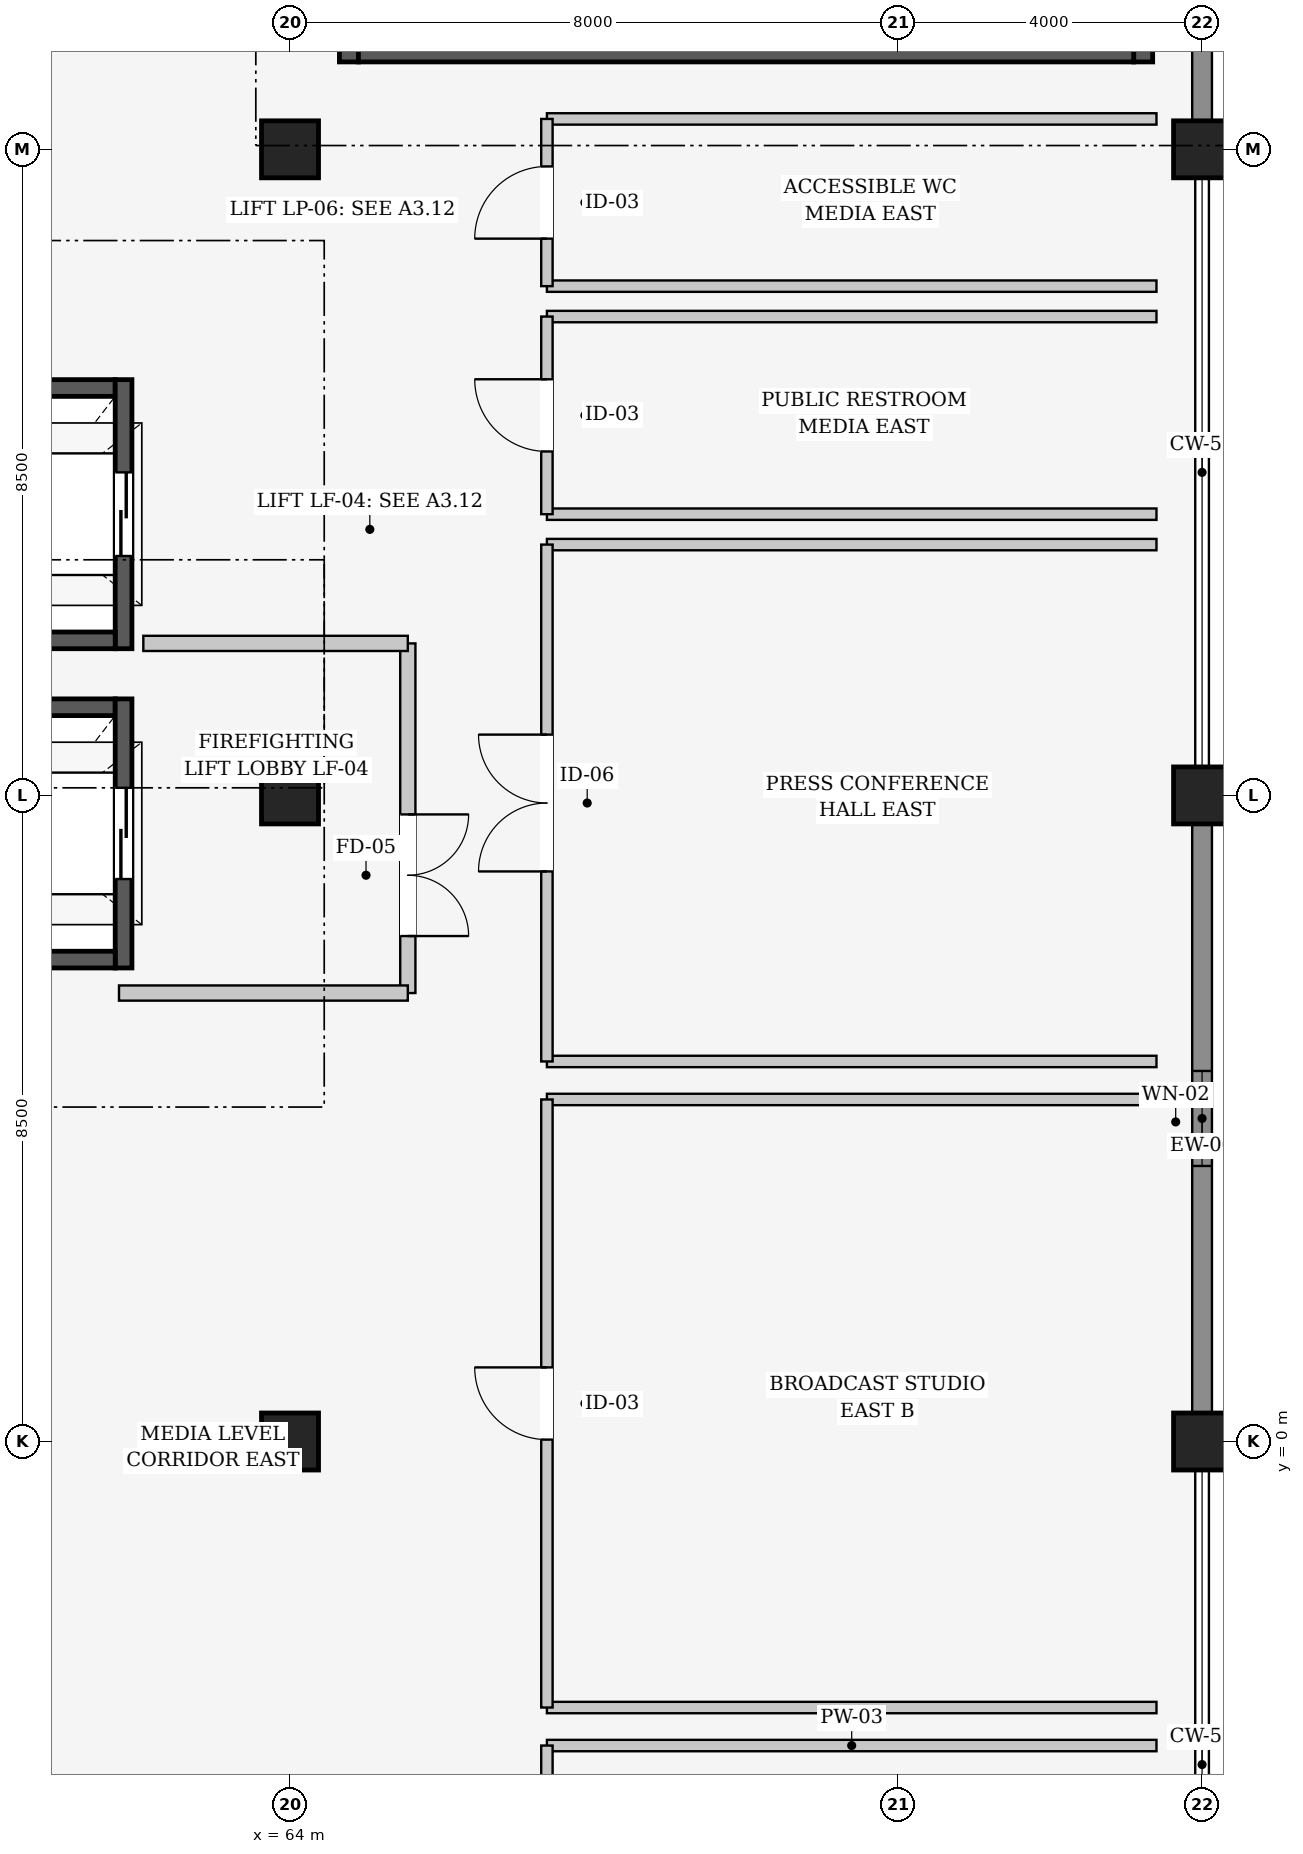
"""IFC4 building model, lengths in metres.
Left out: names, types, materials, properties, quantities, classifications, styles, units other than length and angle.
Written with IfcOpenShell. Run it as: python <this file> out.ifc"""

import sys

from ifc_helpers import new_model, si_unit, direction, frame, frame_2d, origin, origin_2d, place, context, subcontext, project, spatial, rectangle, extrude, element, fill, save


model = new_model("IFC4")
c1 = context("Model", 3, precision=1e-05, world=origin(), true_north=direction((0.0, 1.0)))
c2 = subcontext(c1, "Body", "Model", "MODEL_VIEW")
j1 = project(units=[si_unit("LENGTHUNIT", "METRE"), si_unit("PLANEANGLEUNIT", "RADIAN")], contexts=[c1])
p1 = place(None, origin())
s1 = spatial("IfcSite", under=j1, at=p1, CompositionType="ELEMENT")
p2 = place(p1, origin())
s2 = spatial("IfcBuilding", under=s1, at=p2, CompositionType="ELEMENT")
p3 = place(p2, frame((0.0, 0.0, 26.4)))
s3 = spatial("IfcBuildingStorey", under=s2, at=p3, CompositionType="ELEMENT", Elevation=26.4)
for number, where, z_axis, x_axis in (
    (1, (64.0, 0.0, 0.0), (0.0, 0.0, 1.0), (1.0, 0.0, 0.0)),
    (2, (64.0, 8.5, 0.0), (0.0, 0.0, 1.0), (1.0, 0.0, 0.0)),
    (3, (64.0, 17.0, 0.0), (0.0, 0.0, 1.0), (1.0, 0.0, 0.0)),
    (4, (76.0, 0.0, 0.0), (0.0, 0.0, 1.0), (1.0, 0.0, 0.0)),
    (5, (76.0, 8.5, 0.0), (0.0, 0.0, 1.0), (1.0, 0.0, 0.0)),
    (6, (76.0, 17.0, 0.0), (0.0, 0.0, 1.0), (1.0, 0.0, 0.0)),
):
    element("IfcColumn", number, at=place(p3, frame(where, z_axis=z_axis, x_axis=x_axis)), inside=s3, PredefinedType="COLUMN", context=c2, shape_type="SweptSolid", body=[
        extrude(rectangle(XDim=0.75, YDim=0.75, at=origin_2d()), origin(), (0.0, 0.0, 1.0), 5.4),
    ])
p4 = place(p3, frame((76.0, 8.143, 0.0), z_axis=(0.0, 0.0, 1.0), x_axis=(0.0, -1.0, 0.0)))
e7 = element("IfcWall", 7, at=p4, inside=s3, PredefinedType="SOLIDWALL", context=c2, shape_type="SweptSolid", body=[
    extrude(rectangle(XDim=7.786, YDim=0.26, at=frame_2d((3.893, 0.0))), origin(), (0.0, 0.0, 1.0), 4.22),
])
p5 = place(p4, frame((3.268, 0.0, 0.95)))
e8 = element("IfcOpeningElement", 8, at=p5, cuts=e7, PredefinedType="OPENING", context=c2, shape_type="SweptSolid", body=[
    extrude(rectangle(XDim=1.25, YDim=1.25, at=frame_2d((0.625, 0.625))), frame((0.0, 0.14, 0.0), z_axis=(0.0, -1.0, 0.0), x_axis=(1.0, 0.0, 0.0)), (0.0, 0.0, 1.0), 0.28),
])
p6 = place(p3, frame((76.0, 24.643, 0.0), z_axis=(0.0, 0.0, 1.0), x_axis=(0.0, -1.0, 0.0)))
e9 = element("IfcWall", 9, at=p6, inside=s3, PredefinedType="SOLIDWALL", context=c2, shape_type="SweptSolid", body=[
    extrude(rectangle(XDim=7.286, YDim=0.26, at=frame_2d((3.643, 0.0))), origin(), (0.0, 0.0, 1.0), 4.22),
])
p7 = place(p6, frame((2.918, 0.0, 0.95)))
e10 = element("IfcOpeningElement", 10, at=p7, cuts=e9, PredefinedType="OPENING", context=c2, shape_type="SweptSolid", body=[
    extrude(rectangle(XDim=1.45, YDim=1.25, at=frame_2d((0.725, 0.625))), frame((0.0, 0.14, 0.0), z_axis=(0.0, -1.0, 0.0), x_axis=(1.0, 0.0, 0.0)), (0.0, 0.0, 1.0), 0.28),
])
p8 = place(p3, frame((64.775, 18.15, 0.0), z_axis=(0.0, 0.0, 1.0), x_axis=(0.0, 1.0, 0.0)))
e11 = element("IfcWall", 11, at=p8, inside=s3, PredefinedType="SHEAR", context=c2, shape_type="SweptSolid", body=[
    extrude(rectangle(XDim=5.7, YDim=0.25, at=frame_2d((2.85, 0.0))), origin(), (0.0, 0.0, 1.0), 3.6),
])
p9 = place(p8, frame((2.1, 0.0, 0.0)))
e12 = element("IfcOpeningElement", 12, at=p9, cuts=e11, PredefinedType="OPENING", context=c2, shape_type="SweptSolid", body=[
    extrude(rectangle(XDim=1.5, YDim=2.2, at=frame_2d((0.75, 1.1))), frame((0.0, 0.135, 0.0), z_axis=(0.0, -1.0, 0.0), x_axis=(1.0, 0.0, 0.0)), (0.0, 0.0, 1.0), 0.27),
])
p10 = place(p3, frame((75.225, 23.85, 0.0), z_axis=(0.0, 0.0, 1.0), x_axis=(0.0, -1.0, 0.0)))
e13 = element("IfcWall", 13, at=p10, inside=s3, PredefinedType="SHEAR", context=c2, shape_type="SweptSolid", body=[
    extrude(rectangle(XDim=5.7, YDim=0.25, at=frame_2d((2.85, 0.0))), origin(), (0.0, 0.0, 1.0), 3.6),
])
p11 = place(p3, frame((75.1, 18.275, 0.0), z_axis=(0.0, 0.0, 1.0), x_axis=(-1.0, 0.0, 0.0)))
e14 = element("IfcWall", 14, at=p11, inside=s3, PredefinedType="SHEAR", context=c2, shape_type="SweptSolid", body=[
    extrude(rectangle(XDim=10.2, YDim=0.25, at=frame_2d((5.1, 0.0))), origin(), (0.0, 0.0, 1.0), 3.6),
])
p12 = place(p3, frame((59.3, 9.66, 0.0), z_axis=(0.0, 0.0, 1.0), x_axis=(1.0, 0.0, 0.0)))
e15 = element("IfcWall", 15, at=p12, inside=s3, PredefinedType="SHEAR", context=c2, shape_type="SweptSolid", body=[
    extrude(rectangle(XDim=2.4, YDim=0.22, at=frame_2d((1.2, 0.0))), origin(), (0.0, 0.0, 1.0), 6.8),
])
p13 = place(p3, frame((61.81, 9.77, 0.0), z_axis=(0.0, 0.0, 1.0), x_axis=(0.0, -1.0, 0.0)))
e16 = element("IfcWall", 16, at=p13, inside=s3, PredefinedType="SHEAR", context=c2, shape_type="SweptSolid", body=[
    extrude(rectangle(XDim=3.54, YDim=0.22, at=frame_2d((1.77, 0.0))), origin(), (0.0, 0.0, 1.0), 6.8),
])
p14 = place(p13, frame((1.17, 0.0, 0.0)))
e17 = element("IfcOpeningElement", 17, at=p14, cuts=e16, PredefinedType="OPENING", context=c2, shape_type="SweptSolid", body=[
    extrude(rectangle(XDim=1.2, YDim=2.2, at=frame_2d((0.6, 1.1))), frame((0.0, 0.12, 0.0), z_axis=(0.0, -1.0, 0.0), x_axis=(1.0, 0.0, 0.0)), (0.0, 0.0, 1.0), 0.24),
])
for number, where, z_axis, x_axis in (
    (18, (61.7, 6.34, 0.0), (0.0, 0.0, 1.0), (-1.0, 0.0, 0.0)),
    (19, (59.3, 13.86, 0.0), (0.0, 0.0, 1.0), (1.0, 0.0, 0.0)),
):
    element("IfcWall", number, at=place(p3, frame(where, z_axis=z_axis, x_axis=x_axis)), inside=s3, PredefinedType="SHEAR", context=c2, shape_type="SweptSolid", body=[
        extrude(rectangle(XDim=2.4, YDim=0.22, at=frame_2d((1.2, 0.0))), origin(), (0.0, 0.0, 1.0), 6.8),
    ])
p15 = place(p3, frame((61.81, 13.97, 0.0), z_axis=(0.0, 0.0, 1.0), x_axis=(0.0, -1.0, 0.0)))
e20 = element("IfcWall", 20, at=p15, inside=s3, PredefinedType="SHEAR", context=c2, shape_type="SweptSolid", body=[
    extrude(rectangle(XDim=3.54, YDim=0.22, at=frame_2d((1.77, 0.0))), origin(), (0.0, 0.0, 1.0), 6.8),
])
p16 = place(p15, frame((1.22, 0.0, 0.0)))
e21 = element("IfcOpeningElement", 21, at=p16, cuts=e20, PredefinedType="OPENING", context=c2, shape_type="SweptSolid", body=[
    extrude(rectangle(XDim=1.1, YDim=2.2, at=frame_2d((0.55, 1.1))), frame((0.0, 0.12, 0.0), z_axis=(0.0, -1.0, 0.0), x_axis=(1.0, 0.0, 0.0)), (0.0, 0.0, 1.0), 0.24),
])
p17 = place(p3, frame((61.7, 10.54, 0.0), z_axis=(0.0, 0.0, 1.0), x_axis=(-1.0, 0.0, 0.0)))
e22 = element("IfcWall", 22, at=p17, inside=s3, PredefinedType="SHEAR", context=c2, shape_type="SweptSolid", body=[
    extrude(rectangle(XDim=2.4, YDim=0.22, at=frame_2d((1.2, 0.0))), origin(), (0.0, 0.0, 1.0), 6.8),
])
p18 = place(p3, frame((65.55, 10.5, 0.0), z_axis=(0.0, 0.0, 1.0), x_axis=(0.0, -1.0, 0.0)))
e23 = element("IfcWall", 23, at=p18, inside=s3, PredefinedType="PARTITIONING", context=c2, shape_type="SweptSolid", body=[
    extrude(rectangle(XDim=4.6, YDim=0.2, at=frame_2d((2.3, 0.0))), origin(), (0.0, 0.0, 1.0), 4.205),
])
p19 = place(p18, frame((2.25, 0.0, 0.0)))
e24 = element("IfcOpeningElement", 24, at=p19, cuts=e23, PredefinedType="OPENING", context=c2, shape_type="SweptSolid", body=[
    extrude(rectangle(XDim=1.6, YDim=2.2, at=frame_2d((0.8, 1.1))), frame((0.0, 0.11, 0.0), z_axis=(0.0, -1.0, 0.0), x_axis=(1.0, 0.0, 0.0)), (0.0, 0.0, 1.0), 0.22),
])
p20 = place(p3, frame((62.07, 10.5, 0.0), z_axis=(0.0, 0.0, 1.0), x_axis=(1.0, 0.0, 0.0)))
e25 = element("IfcWall", 25, at=p20, inside=s3, PredefinedType="PARTITIONING", context=c2, shape_type="SweptSolid", body=[
    extrude(rectangle(XDim=3.48, YDim=0.2, at=frame_2d((1.74, 0.0))), origin(), (0.0, 0.0, 1.0), 4.505),
])
p21 = place(p3, frame((65.55, 5.9, 0.0), z_axis=(0.0, 0.0, 1.0), x_axis=(-1.0, 0.0, 0.0)))
e26 = element("IfcWall", 26, at=p21, inside=s3, PredefinedType="PARTITIONING", context=c2, shape_type="SweptSolid", body=[
    extrude(rectangle(XDim=3.8, YDim=0.2, at=frame_2d((1.9, 0.0))), origin(), (0.0, 0.0, 1.0), 4.505),
])
p22 = place(p3, frame((67.38, -4.0, 0.0), z_axis=(0.0, 0.0, 1.0), x_axis=(1.0, 0.0, 0.0)))
e27 = element("IfcWall", 27, at=p22, inside=s3, PredefinedType="PARTITIONING", context=c2, shape_type="SweptSolid", body=[
    extrude(rectangle(XDim=8.02, YDim=0.15, at=frame_2d((4.01, 0.0))), origin(), (0.0, 0.0, 1.0), 4.842),
])
p23 = place(p3, frame((67.38, -13.0, 0.0), z_axis=(0.0, 0.0, 1.0), x_axis=(0.0, 1.0, 0.0)))
e28 = element("IfcWall", 28, at=p23, inside=s3, PredefinedType="PARTITIONING", context=c2, shape_type="SweptSolid", body=[
    extrude(rectangle(XDim=9.0, YDim=0.15, at=frame_2d((4.5, 0.0))), origin(), (0.0, 0.0, 1.0), 4.205),
])
p24 = place(p23, frame((4.025, 0.0, 0.0)))
e29 = element("IfcOpeningElement", 29, at=p24, cuts=e28, PredefinedType="OPENING", context=c2, shape_type="SweptSolid", body=[
    extrude(rectangle(XDim=0.95, YDim=2.15, at=frame_2d((0.475, 1.075))), frame((0.0, 0.085, 0.0), z_axis=(0.0, -1.0, 0.0), x_axis=(1.0, 0.0, 0.0)), (0.0, 0.0, 1.0), 0.17),
])
p25 = place(p3, frame((67.38, 4.5, 0.0), z_axis=(0.0, 0.0, 1.0), x_axis=(1.0, 0.0, 0.0)))
e30 = element("IfcWall", 30, at=p25, inside=s3, PredefinedType="PARTITIONING", context=c2, shape_type="SweptSolid", body=[
    extrude(rectangle(XDim=8.02, YDim=0.15, at=frame_2d((4.01, 0.0))), origin(), (0.0, 0.0, 1.0), 4.842),
])
p26 = place(p3, frame((75.4, -3.5, 0.0), z_axis=(0.0, 0.0, 1.0), x_axis=(-1.0, 0.0, 0.0)))
e31 = element("IfcWall", 31, at=p26, inside=s3, PredefinedType="PARTITIONING", context=c2, shape_type="SweptSolid", body=[
    extrude(rectangle(XDim=8.02, YDim=0.15, at=frame_2d((4.01, 0.0))), origin(), (0.0, 0.0, 1.0), 5.04),
])
p27 = place(p3, frame((67.38, -3.5, 0.0), z_axis=(0.0, 0.0, 1.0), x_axis=(0.0, 1.0, 0.0)))
e32 = element("IfcWall", 32, at=p27, inside=s3, PredefinedType="PARTITIONING", context=c2, shape_type="SweptSolid", body=[
    extrude(rectangle(XDim=8.0, YDim=0.15, at=frame_2d((4.0, 0.0))), origin(), (0.0, 0.0, 1.0), 4.205),
])
p28 = place(p27, frame((3.525, 0.0, 0.0)))
e33 = element("IfcOpeningElement", 33, at=p28, cuts=e32, PredefinedType="OPENING", context=c2, shape_type="SweptSolid", body=[
    extrude(rectangle(XDim=0.95, YDim=2.15, at=frame_2d((0.475, 1.075))), frame((0.0, 0.085, 0.0), z_axis=(0.0, -1.0, 0.0), x_axis=(1.0, 0.0, 0.0)), (0.0, 0.0, 1.0), 0.17),
])
for number, where, z_axis, x_axis in (
    (34, (67.38, 11.8, 0.0), (0.0, 0.0, 1.0), (1.0, 0.0, 0.0)),
    (35, (75.4, 5.0, 0.0), (0.0, 0.0, 1.0), (-1.0, 0.0, 0.0)),
):
    element("IfcWall", number, at=place(p3, frame(where, z_axis=z_axis, x_axis=x_axis)), inside=s3, PredefinedType="PARTITIONING", context=c2, shape_type="SweptSolid", body=[
        extrude(rectangle(XDim=8.02, YDim=0.15, at=frame_2d((4.01, 0.0))), origin(), (0.0, 0.0, 1.0), 5.04),
    ])
p29 = place(p3, frame((67.38, 5.0, 0.0), z_axis=(0.0, 0.0, 1.0), x_axis=(0.0, 1.0, 0.0)))
e36 = element("IfcWall", 36, at=p29, inside=s3, PredefinedType="PARTITIONING", context=c2, shape_type="SweptSolid", body=[
    extrude(rectangle(XDim=6.8, YDim=0.15, at=frame_2d((3.4, 0.0))), origin(), (0.0, 0.0, 1.0), 4.205),
])
p30 = place(p29, frame((2.5, 0.0, 0.0)))
e37 = element("IfcOpeningElement", 37, at=p30, cuts=e36, PredefinedType="OPENING", context=c2, shape_type="SweptSolid", body=[
    extrude(rectangle(XDim=1.8, YDim=2.2, at=frame_2d((0.9, 1.1))), frame((0.0, 0.085, 0.0), z_axis=(0.0, -1.0, 0.0), x_axis=(1.0, 0.0, 0.0)), (0.0, 0.0, 1.0), 0.17),
])
for number, where, z_axis, x_axis in (
    (38, (67.38, 14.8, 0.0), (0.0, 0.0, 1.0), (1.0, 0.0, 0.0)),
    (39, (75.4, 12.2, 0.0), (0.0, 0.0, 1.0), (-1.0, 0.0, 0.0)),
):
    element("IfcWall", number, at=place(p3, frame(where, z_axis=z_axis, x_axis=x_axis)), inside=s3, PredefinedType="PARTITIONING", context=c2, shape_type="SweptSolid", body=[
        extrude(rectangle(XDim=8.02, YDim=0.15, at=frame_2d((4.01, 0.0))), origin(), (0.0, 0.0, 1.0), 5.04),
    ])
p31 = place(p3, frame((67.38, 12.2, 0.0), z_axis=(0.0, 0.0, 1.0), x_axis=(0.0, 1.0, 0.0)))
e40 = element("IfcWall", 40, at=p31, inside=s3, PredefinedType="PARTITIONING", context=c2, shape_type="SweptSolid", body=[
    extrude(rectangle(XDim=2.6, YDim=0.15, at=frame_2d((1.3, 0.0))), origin(), (0.0, 0.0, 1.0), 4.842),
])
p32 = place(p31, frame((0.825, 0.0, 0.0)))
e41 = element("IfcOpeningElement", 41, at=p32, cuts=e40, PredefinedType="OPENING", context=c2, shape_type="SweptSolid", body=[
    extrude(rectangle(XDim=0.95, YDim=2.15, at=frame_2d((0.475, 1.075))), frame((0.0, 0.085, 0.0), z_axis=(0.0, -1.0, 0.0), x_axis=(1.0, 0.0, 0.0)), (0.0, 0.0, 1.0), 0.17),
])
p33 = place(p3, frame((67.38, 17.4, 0.0), z_axis=(0.0, 0.0, 1.0), x_axis=(1.0, 0.0, 0.0)))
e42 = element("IfcWall", 42, at=p33, inside=s3, PredefinedType="PARTITIONING", context=c2, shape_type="SweptSolid", body=[
    extrude(rectangle(XDim=8.02, YDim=0.15, at=frame_2d((4.01, 0.0))), origin(), (0.0, 0.0, 1.0), 4.205),
])
p34 = place(p3, frame((75.4, 15.2, 0.0), z_axis=(0.0, 0.0, 1.0), x_axis=(-1.0, 0.0, 0.0)))
e43 = element("IfcWall", 43, at=p34, inside=s3, PredefinedType="PARTITIONING", context=c2, shape_type="SweptSolid", body=[
    extrude(rectangle(XDim=8.02, YDim=0.15, at=frame_2d((4.01, 0.0))), origin(), (0.0, 0.0, 1.0), 5.04),
])
p35 = place(p3, frame((67.38, 15.2, 0.0), z_axis=(0.0, 0.0, 1.0), x_axis=(0.0, 1.0, 0.0)))
e44 = element("IfcWall", 44, at=p35, inside=s3, PredefinedType="PARTITIONING", context=c2, shape_type="SweptSolid", body=[
    extrude(rectangle(XDim=2.2, YDim=0.15, at=frame_2d((1.1, 0.0))), origin(), (0.0, 0.0, 1.0), 4.205),
])
p36 = place(p35, frame((0.625, 0.0, 0.0)))
e45 = element("IfcOpeningElement", 45, at=p36, cuts=e44, PredefinedType="OPENING", context=c2, shape_type="SweptSolid", body=[
    extrude(rectangle(XDim=0.95, YDim=2.15, at=frame_2d((0.475, 1.075))), frame((0.0, 0.085, 0.0), z_axis=(0.0, -1.0, 0.0), x_axis=(1.0, 0.0, 0.0)), (0.0, 0.0, 1.0), 0.17),
])
p37 = place(p5, origin())
e46 = element("IfcWindow", 46, at=p37, inside=s3, PartitioningType="SINGLE_PANEL", PredefinedType="WINDOW", context=c2, shape_type="SweptSolid", body=[
    extrude(rectangle(XDim=1.25, YDim=1.25, at=frame_2d((0.625, 0.625))), frame((0.0, 0.03, 0.0), z_axis=(0.0, -1.0, 0.0), x_axis=(1.0, 0.0, 0.0)), (0.0, 0.0, 1.0), 0.06),
])
fill(e8, e46)
p38 = place(p14, origin())
e47 = element("IfcDoor", 47, at=p38, inside=s3, OperationType="SLIDING_TO_LEFT", PredefinedType="DOOR", context=c2, shape_type="SweptSolid", body=[
    extrude(rectangle(XDim=1.2, YDim=2.2, at=frame_2d((0.6, 1.1))), frame((0.0, 0.025, 0.0), z_axis=(0.0, -1.0, 0.0), x_axis=(1.0, 0.0, 0.0)), (0.0, 0.0, 1.0), 0.05),
])
fill(e17, e47)
p39 = place(p16, origin())
e48 = element("IfcDoor", 48, at=p39, inside=s3, OperationType="SLIDING_TO_LEFT", PredefinedType="DOOR", context=c2, shape_type="SweptSolid", body=[
    extrude(rectangle(XDim=1.1, YDim=2.2, at=frame_2d((0.55, 1.1))), frame((0.0, 0.025, 0.0), z_axis=(0.0, -1.0, 0.0), x_axis=(1.0, 0.0, 0.0)), (0.0, 0.0, 1.0), 0.05),
])
fill(e21, e48)
p40 = place(p19, origin())
e49 = element("IfcDoor", 49, at=p40, inside=s3, OperationType="DOUBLE_DOOR_SINGLE_SWING", PredefinedType="DOOR", context=c2, shape_type="SweptSolid", body=[
    extrude(rectangle(XDim=1.6, YDim=2.2, at=frame_2d((0.8, 1.1))), frame((0.0, 0.025, 0.0), z_axis=(0.0, -1.0, 0.0), x_axis=(1.0, 0.0, 0.0)), (0.0, 0.0, 1.0), 0.05),
])
fill(e24, e49)
p41 = place(p28, origin())
e50 = element("IfcDoor", 50, at=p41, inside=s3, OperationType="SINGLE_SWING_RIGHT", PredefinedType="DOOR", context=c2, shape_type="SweptSolid", body=[
    extrude(rectangle(XDim=0.95, YDim=2.15, at=frame_2d((0.475, 1.075))), frame((0.0, 0.025, 0.0), z_axis=(0.0, -1.0, 0.0), x_axis=(1.0, 0.0, 0.0)), (0.0, 0.0, 1.0), 0.05),
])
fill(e33, e50)
p42 = place(p30, origin())
e51 = element("IfcDoor", 51, at=p42, inside=s3, OperationType="DOUBLE_DOOR_SINGLE_SWING", PredefinedType="DOOR", context=c2, shape_type="SweptSolid", body=[
    extrude(rectangle(XDim=1.8, YDim=2.2, at=frame_2d((0.9, 1.1))), frame((0.0, 0.025, 0.0), z_axis=(0.0, -1.0, 0.0), x_axis=(1.0, 0.0, 0.0)), (0.0, 0.0, 1.0), 0.05),
])
fill(e37, e51)
p43 = place(p32, origin())
e52 = element("IfcDoor", 52, at=p43, inside=s3, OperationType="SINGLE_SWING_RIGHT", PredefinedType="DOOR", context=c2, shape_type="SweptSolid", body=[
    extrude(rectangle(XDim=0.95, YDim=2.15, at=frame_2d((0.475, 1.075))), frame((0.0, 0.025, 0.0), z_axis=(0.0, -1.0, 0.0), x_axis=(1.0, 0.0, 0.0)), (0.0, 0.0, 1.0), 0.05),
])
fill(e41, e52)
p44 = place(p36, origin())
e53 = element("IfcDoor", 53, at=p44, inside=s3, OperationType="SINGLE_SWING_LEFT", PredefinedType="DOOR", context=c2, shape_type="SweptSolid", body=[
    extrude(rectangle(XDim=0.95, YDim=2.15, at=frame_2d((0.475, 1.075))), frame((0.0, 0.025, 0.0), z_axis=(0.0, -1.0, 0.0), x_axis=(1.0, 0.0, 0.0)), (0.0, 0.0, 1.0), 0.05),
])
fill(e45, e53)
save(model, sys.argv[1])
